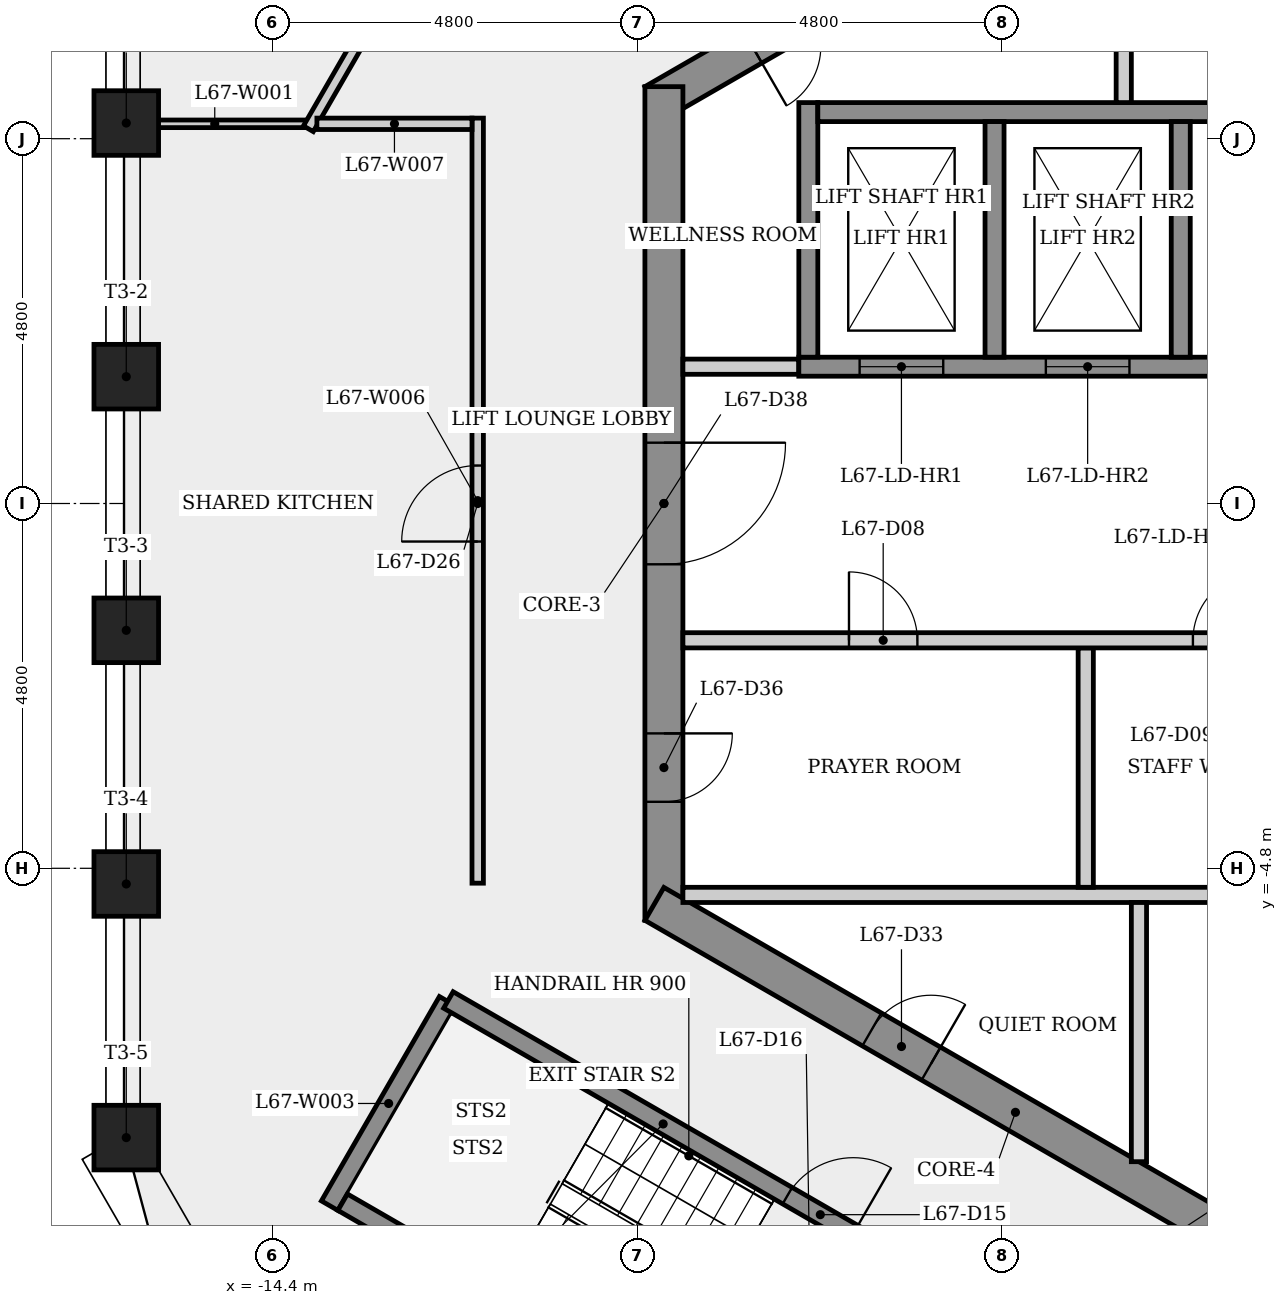
"""IFC4 building model, lengths in metres.
Left out: names, types, materials, properties, quantities, classifications, styles, units other than length and angle.
Written with IfcOpenShell. Run it as: python <this file> out.ifc"""

import sys

from ifc_helpers import new_model, si_unit, direction, frame, frame_2d, origin, origin_2d, place, context, subcontext, project, spatial, rectangle, extrude, element, fill, save


model = new_model("IFC4")
c1 = context("Model", 3, precision=1e-05, world=origin(), true_north=direction((0.0, 1.0)))
c2 = subcontext(c1, "Body", "Model", "MODEL_VIEW")
j1 = project(units=[si_unit("LENGTHUNIT", "METRE"), si_unit("PLANEANGLEUNIT", "RADIAN")], contexts=[c1])
p1 = place(None, origin())
s1 = spatial("IfcSite", under=j1, at=p1, CompositionType="ELEMENT")
p2 = place(p1, origin())
s2 = spatial("IfcBuilding", under=s1, at=p2, CompositionType="ELEMENT")
p3 = place(p2, frame((0.0, 0.0, 249.5)))
s3 = spatial("IfcBuildingStorey", under=s2, at=p3, CompositionType="ELEMENT", Elevation=249.5)
p4 = place(p3, frame((0.125, 10.753, 0.0), z_axis=(0.0, 0.0, 1.0), x_axis=(-0.866023993627, -0.500002442456, 0.0)))
e1 = element("IfcWall", 1, at=p4, inside=s3, PredefinedType="SHEAR", context=c2, shape_type="SweptSolid", body=[
    extrude(rectangle(XDim=10.97, YDim=0.5, at=frame_2d((5.485, 0.0))), origin(), (0.0, 0.0, 1.0), 3.4),
])
p5 = place(p4, frame((8.581, 0.0, 0.0)))
e2 = element("IfcOpeningElement", 2, at=p5, cuts=e1, PredefinedType="OPENING", context=c2, shape_type="SweptSolid", body=[
    extrude(rectangle(XDim=0.9, YDim=2.1, at=frame_2d((0.45, 1.05))), frame((0.0, 0.26, 0.0), z_axis=(0.0, -1.0, 0.0), x_axis=(1.0, 0.0, 0.0)), (0.0, 0.0, 1.0), 0.52),
])
p6 = place(p4, frame((1.687, 0.0, 0.0)))
e3 = element("IfcOpeningElement", 3, at=p6, cuts=e1, PredefinedType="OPENING", context=c2, shape_type="SweptSolid", body=[
    extrude(rectangle(XDim=0.9, YDim=2.1, at=frame_2d((0.45, 1.05))), frame((0.0, 0.26, 0.0), z_axis=(0.0, -1.0, 0.0), x_axis=(1.0, 0.0, 0.0)), (0.0, 0.0, 1.0), 0.52),
])
p7 = place(p3, frame((-9.25, 5.485, 0.0), z_axis=(0.0, 0.0, 1.0), x_axis=(0.0, -1.0, 0.0)))
e4 = element("IfcWall", 4, at=p7, inside=s3, PredefinedType="SHEAR", context=c2, shape_type="SweptSolid", body=[
    extrude(rectangle(XDim=10.97, YDim=0.5, at=frame_2d((5.485, 0.0))), origin(), (0.0, 0.0, 1.0), 3.4),
])
p8 = place(p7, frame((8.51, 0.0, 0.0)))
e5 = element("IfcOpeningElement", 5, at=p8, cuts=e4, PredefinedType="OPENING", context=c2, shape_type="SweptSolid", body=[
    extrude(rectangle(XDim=0.9, YDim=2.1, at=frame_2d((0.45, 1.05))), frame((0.0, 0.26, 0.0), z_axis=(0.0, -1.0, 0.0), x_axis=(1.0, 0.0, 0.0)), (0.0, 0.0, 1.0), 0.52),
])
p9 = place(p7, frame((4.685, 0.0, 0.0)))
e6 = element("IfcOpeningElement", 6, at=p9, cuts=e4, PredefinedType="OPENING", context=c2, shape_type="SweptSolid", body=[
    extrude(rectangle(XDim=1.6, YDim=2.1, at=frame_2d((0.8, 1.05))), frame((0.0, 0.26, 0.0), z_axis=(0.0, -1.0, 0.0), x_axis=(1.0, 0.0, 0.0)), (0.0, 0.0, 1.0), 0.52),
])
p10 = place(p3, frame((-9.375, -5.268, 0.0), z_axis=(0.0, 0.0, 1.0), x_axis=(0.866023993627, -0.500002442456, 0.0)))
e7 = element("IfcWall", 7, at=p10, inside=s3, PredefinedType="SHEAR", context=c2, shape_type="SweptSolid", body=[
    extrude(rectangle(XDim=10.97, YDim=0.5, at=frame_2d((5.485, 0.0))), origin(), (0.0, 0.0, 1.0), 3.4),
])
p11 = place(p10, frame((3.303, 0.0, 0.0)))
e8 = element("IfcOpeningElement", 8, at=p11, cuts=e7, PredefinedType="OPENING", context=c2, shape_type="SweptSolid", body=[
    extrude(rectangle(XDim=0.9, YDim=2.1, at=frame_2d((0.45, 1.05))), frame((0.0, 0.26, 0.0), z_axis=(0.0, -1.0, 0.0), x_axis=(1.0, 0.0, 0.0)), (0.0, 0.0, 1.0), 0.52),
])
for number, where, z_axis, x_axis in (
    (9, (-16.324, 5.006, 0.0), (0.0, 0.0, 1.0), (-1.0, 0.0, 0.0)),
    (10, (-16.324, 1.669, 0.0), (0.0, 0.0, 1.0), (-1.0, 0.0, 0.0)),
    (11, (-16.324, -1.669, 0.0), (0.0, 0.0, 1.0), (-1.0, 0.0, 0.0)),
    (12, (-16.324, -5.006, 0.0), (0.0, 0.0, 1.0), (-1.0, 0.0, 0.0)),
    (13, (-16.324, -8.344, 0.0), (0.0, 0.0, 1.0), (-1.0, 0.0, 0.0)),
):
    element("IfcColumn", number, at=place(p3, frame(where, z_axis=z_axis, x_axis=x_axis)), inside=s3, PredefinedType="COLUMN", context=c2, shape_type="SweptSolid", body=[
        extrude(rectangle(XDim=0.85, YDim=0.85, at=origin_2d()), origin(), (0.0, 0.0, 1.0), 3.4),
    ])
p12 = place(p3, frame((-13.966, 4.996, 0.0), z_axis=(0.0, 0.0, 1.0), x_axis=(-1.0, 0.0, 0.0)))
e14 = element("IfcWall", 14, at=p12, inside=s3, PredefinedType="PARTITIONING", context=c2, shape_type="SweptSolid", body=[
    extrude(rectangle(XDim=2.388, YDim=0.1, at=frame_2d((1.194, 0.0))), origin(), (0.0, 0.0, 1.0), 3.0),
])
p13 = place(p3, frame((-13.928, 4.931, 0.0), z_axis=(0.0, 0.0, 1.0), x_axis=(0.499980697609, 0.866036547738, 0.0)))
e15 = element("IfcWall", 15, at=p13, inside=s3, PredefinedType="PARTITIONING", context=c2, shape_type="SweptSolid", body=[
    extrude(rectangle(XDim=6.029, YDim=0.15, at=frame_2d((3.014, 0.0))), origin(), (0.0, 0.0, 1.0), 3.0),
])
p14 = place(p13, frame((2.514, 0.0, 0.0)))
e16 = element("IfcOpeningElement", 16, at=p14, cuts=e15, PredefinedType="OPENING", context=c2, shape_type="SweptSolid", body=[
    extrude(rectangle(XDim=1.0, YDim=2.1, at=frame_2d((0.5, 1.05))), frame((0.0, 0.085, 0.0), z_axis=(0.0, -1.0, 0.0), x_axis=(1.0, 0.0, 0.0)), (0.0, 0.0, 1.0), 0.17),
])
p15 = place(p3, frame((-13.648, -9.239, 0.0), z_axis=(0.0, 0.0, 1.0), x_axis=(0.500003782172, 0.866023220135, 0.0)))
e17 = element("IfcWall", 17, at=p15, inside=s3, PredefinedType="SHEAR", context=c2, shape_type="SweptSolid", body=[
    extrude(rectangle(XDim=3.105, YDim=0.25, at=frame_2d((1.552, 0.0))), origin(), (0.0, 0.0, 1.0), 3.0),
])
p16 = place(p3, frame((-12.085, -6.532, 0.0), z_axis=(0.0, 0.0, 1.0), x_axis=(0.866031063448, -0.499990197047, 0.0)))
e18 = element("IfcWall", 18, at=p16, inside=s3, PredefinedType="SHEAR", context=c2, shape_type="SweptSolid", body=[
    extrude(rectangle(XDim=6.525, YDim=0.25, at=frame_2d((3.263, 0.0))), origin(), (0.0, 0.0, 1.0), 3.0),
])
p17 = place(p16, frame((5.15, 0.0, 0.0)))
e19 = element("IfcOpeningElement", 19, at=p17, cuts=e18, PredefinedType="OPENING", context=c2, shape_type="SweptSolid", body=[
    extrude(rectangle(XDim=1.0, YDim=2.1, at=frame_2d((0.5, 1.05))), frame((0.0, 0.135, 0.0), z_axis=(0.0, -1.0, 0.0), x_axis=(1.0, 0.0, 0.0)), (0.0, 0.0, 1.0), 0.27),
])
p18 = place(p3, frame((-11.7, -4.996, 0.0), z_axis=(0.0, 0.0, 1.0), x_axis=(0.0, 1.0, 0.0)))
e20 = element("IfcWall", 20, at=p18, inside=s3, PredefinedType="PARTITIONING", context=c2, shape_type="SweptSolid", body=[
    extrude(rectangle(XDim=10.067, YDim=0.15, at=frame_2d((5.033, 0.0))), origin(), (0.0, 0.0, 1.0), 3.0),
])
p19 = place(p18, frame((4.495, 0.0, 0.0)))
e21 = element("IfcOpeningElement", 21, at=p19, cuts=e20, PredefinedType="OPENING", context=c2, shape_type="SweptSolid", body=[
    extrude(rectangle(XDim=1.0, YDim=2.1, at=frame_2d((0.5, 1.05))), frame((0.0, 0.085, 0.0), z_axis=(0.0, -1.0, 0.0), x_axis=(1.0, 0.0, 0.0)), (0.0, 0.0, 1.0), 0.17),
])
p20 = place(p3, frame((-11.775, 4.996, 0.0), z_axis=(0.0, 0.0, 1.0), x_axis=(-1.0, 0.0, 0.0)))
e22 = element("IfcWall", 22, at=p20, inside=s3, PredefinedType="PARTITIONING", context=c2, shape_type="SweptSolid", body=[
    extrude(rectangle(XDim=2.041, YDim=0.15, at=frame_2d((1.021, 0.0))), origin(), (0.0, 0.0, 1.0), 3.0),
])
p21 = place(p3, frame((-9.0, 1.8, 0.0), z_axis=(0.0, 0.0, 1.0), x_axis=(1.0, 0.0, 0.0)))
e23 = element("IfcWall", 23, at=p21, inside=s3, PredefinedType="PARTITIONING", context=c2, shape_type="SweptSolid", body=[
    extrude(rectangle(XDim=1.525, YDim=0.2, at=frame_2d((0.763, 0.0))), origin(), (0.0, 0.0, 1.0), 3.0),
])
p22 = place(p3, frame((-9.0, -5.15, 0.0), z_axis=(0.0, 0.0, 1.0), x_axis=(1.0, 0.0, 0.0)))
e24 = element("IfcWall", 24, at=p22, inside=s3, PredefinedType="PARTITIONING", context=c2, shape_type="SweptSolid", body=[
    extrude(rectangle(XDim=11.325, YDim=0.2, at=frame_2d((5.663, 0.0))), origin(), (0.0, 0.0, 1.0), 3.0),
])
p23 = place(p3, frame((-8.06, -12.321, 0.0), z_axis=(0.0, 0.0, 1.0), x_axis=(-0.866029591389, 0.499992746786, 0.0)))
e25 = element("IfcWall", 25, at=p23, inside=s3, PredefinedType="SHEAR", context=c2, shape_type="SweptSolid", body=[
    extrude(rectangle(XDim=6.255, YDim=0.25, at=frame_2d((3.127, 0.0))), origin(), (0.0, 0.0, 1.0), 3.0),
])
p24 = place(p3, frame((-7.475, 1.8, 0.0), z_axis=(0.0, 0.0, 1.0), x_axis=(1.0, 0.0, 0.0)))
e26 = element("IfcWall", 26, at=p24, inside=s3, PredefinedType="SHEAR", context=c2, shape_type="SweptSolid", body=[
    extrude(rectangle(XDim=14.95, YDim=0.25, at=frame_2d((7.475, 0.0))), origin(), (0.0, 0.0, 1.0), 3.0),
])
p25 = place(p24, frame((0.8, 0.0, 0.0)))
e27 = element("IfcOpeningElement", 27, at=p25, cuts=e26, PredefinedType="OPENING", context=c2, shape_type="SweptSolid", body=[
    extrude(rectangle(XDim=1.1, YDim=2.1, at=frame_2d((0.55, 1.05))), frame((0.0, 0.135, 0.0), z_axis=(0.0, -1.0, 0.0), x_axis=(1.0, 0.0, 0.0)), (0.0, 0.0, 1.0), 0.27),
])
p26 = place(p24, frame((3.25, 0.0, 0.0)))
e28 = element("IfcOpeningElement", 28, at=p26, cuts=e26, PredefinedType="OPENING", context=c2, shape_type="SweptSolid", body=[
    extrude(rectangle(XDim=1.1, YDim=2.1, at=frame_2d((0.55, 1.05))), frame((0.0, 0.135, 0.0), z_axis=(0.0, -1.0, 0.0), x_axis=(1.0, 0.0, 0.0)), (0.0, 0.0, 1.0), 0.27),
])
p27 = place(p24, frame((5.7, 0.0, 0.0)))
e29 = element("IfcOpeningElement", 29, at=p27, cuts=e26, PredefinedType="OPENING", context=c2, shape_type="SweptSolid", body=[
    extrude(rectangle(XDim=1.1, YDim=2.1, at=frame_2d((0.55, 1.05))), frame((0.0, 0.135, 0.0), z_axis=(0.0, -1.0, 0.0), x_axis=(1.0, 0.0, 0.0)), (0.0, 0.0, 1.0), 0.27),
])
p28 = place(p24, frame((8.15, 0.0, 0.0)))
e30 = element("IfcOpeningElement", 30, at=p28, cuts=e26, PredefinedType="OPENING", context=c2, shape_type="SweptSolid", body=[
    extrude(rectangle(XDim=1.1, YDim=2.1, at=frame_2d((0.55, 1.05))), frame((0.0, 0.135, 0.0), z_axis=(0.0, -1.0, 0.0), x_axis=(1.0, 0.0, 0.0)), (0.0, 0.0, 1.0), 0.27),
])
p29 = place(p24, frame((10.6, 0.0, 0.0)))
e31 = element("IfcOpeningElement", 31, at=p29, cuts=e26, PredefinedType="OPENING", context=c2, shape_type="SweptSolid", body=[
    extrude(rectangle(XDim=1.1, YDim=2.1, at=frame_2d((0.55, 1.05))), frame((0.0, 0.135, 0.0), z_axis=(0.0, -1.0, 0.0), x_axis=(1.0, 0.0, 0.0)), (0.0, 0.0, 1.0), 0.27),
])
p30 = place(p24, frame((13.05, 0.0, 0.0)))
e32 = element("IfcOpeningElement", 32, at=p30, cuts=e26, PredefinedType="OPENING", context=c2, shape_type="SweptSolid", body=[
    extrude(rectangle(XDim=1.1, YDim=2.1, at=frame_2d((0.55, 1.05))), frame((0.0, 0.135, 0.0), z_axis=(0.0, -1.0, 0.0), x_axis=(1.0, 0.0, 0.0)), (0.0, 0.0, 1.0), 0.27),
])
p31 = place(p3, frame((-7.35, 1.925, 0.0), z_axis=(0.0, 0.0, 1.0), x_axis=(0.0, 1.0, 0.0)))
e33 = element("IfcWall", 33, at=p31, inside=s3, PredefinedType="SHEAR", context=c2, shape_type="SweptSolid", body=[
    extrude(rectangle(XDim=3.35, YDim=0.25, at=frame_2d((1.675, 0.0))), origin(), (0.0, 0.0, 1.0), 3.0),
])
p32 = place(p3, frame((-7.225, 5.15, 0.0), z_axis=(0.0, 0.0, 1.0), x_axis=(1.0, 0.0, 0.0)))
e34 = element("IfcWall", 34, at=p32, inside=s3, PredefinedType="SHEAR", context=c2, shape_type="SweptSolid", body=[
    extrude(rectangle(XDim=14.7, YDim=0.25, at=frame_2d((7.35, 0.0))), origin(), (0.0, 0.0, 1.0), 3.0),
])
p33 = place(p3, frame((-4.9, 5.025, 0.0), z_axis=(0.0, 0.0, 1.0), x_axis=(0.0, -1.0, 0.0)))
e35 = element("IfcWall", 35, at=p33, inside=s3, PredefinedType="SHEAR", context=c2, shape_type="SweptSolid", body=[
    extrude(rectangle(XDim=3.1, YDim=0.25, at=frame_2d((1.55, 0.0))), origin(), (0.0, 0.0, 1.0), 3.4),
])
p34 = place(p3, frame((-3.7, -1.9, 0.0), z_axis=(0.0, 0.0, 1.0), x_axis=(0.0, -1.0, 0.0)))
e36 = element("IfcWall", 36, at=p34, inside=s3, PredefinedType="PARTITIONING", context=c2, shape_type="SweptSolid", body=[
    extrude(rectangle(XDim=3.15, YDim=0.2, at=frame_2d((1.575, 0.0))), origin(), (0.0, 0.0, 1.0), 3.0),
])
p35 = place(p3, frame((-9.0, -1.8, 0.0), z_axis=(0.0, 0.0, 1.0), x_axis=(1.0, 0.0, 0.0)))
e37 = element("IfcWall", 37, at=p35, inside=s3, PredefinedType="PARTITIONING", context=c2, shape_type="SweptSolid", body=[
    extrude(rectangle(XDim=11.325, YDim=0.2, at=frame_2d((5.663, 0.0))), origin(), (0.0, 0.0, 1.0), 3.0),
])
p36 = place(p35, frame((2.185, 0.0, 0.0)))
e38 = element("IfcOpeningElement", 38, at=p36, cuts=e37, PredefinedType="OPENING", context=c2, shape_type="SweptSolid", body=[
    extrude(rectangle(XDim=0.9, YDim=2.1, at=frame_2d((0.45, 1.05))), frame((0.0, 0.11, 0.0), z_axis=(0.0, -1.0, 0.0), x_axis=(1.0, 0.0, 0.0)), (0.0, 0.0, 1.0), 0.22),
])
p37 = place(p35, frame((6.71, 0.0, 0.0)))
e39 = element("IfcOpeningElement", 39, at=p37, cuts=e37, PredefinedType="OPENING", context=c2, shape_type="SweptSolid", body=[
    extrude(rectangle(XDim=0.9, YDim=2.1, at=frame_2d((0.45, 1.05))), frame((0.0, 0.11, 0.0), z_axis=(0.0, -1.0, 0.0), x_axis=(1.0, 0.0, 0.0)), (0.0, 0.0, 1.0), 0.22),
])
p38 = place(p35, frame((9.713, 0.0, 0.0)))
e40 = element("IfcOpeningElement", 40, at=p38, cuts=e37, PredefinedType="OPENING", context=c2, shape_type="SweptSolid", body=[
    extrude(rectangle(XDim=0.9, YDim=2.1, at=frame_2d((0.45, 1.05))), frame((0.0, 0.11, 0.0), z_axis=(0.0, -1.0, 0.0), x_axis=(1.0, 0.0, 0.0)), (0.0, 0.0, 1.0), 0.22),
])
p39 = place(p3, frame((-3.2, 8.545, 0.0), z_axis=(0.0, 0.0, 1.0), x_axis=(0.0, -1.0, 0.0)))
e41 = element("IfcWall", 41, at=p39, inside=s3, PredefinedType="PARTITIONING", context=c2, shape_type="SweptSolid", body=[
    extrude(rectangle(XDim=3.27, YDim=0.2, at=frame_2d((1.635, 0.0))), origin(), (0.0, 0.0, 1.0), 3.0),
])
p40 = place(p3, frame((-3.0, -5.25, 0.0), z_axis=(0.0, 0.0, 1.0), x_axis=(0.0, -1.0, 0.0)))
e42 = element("IfcWall", 42, at=p40, inside=s3, PredefinedType="PARTITIONING", context=c2, shape_type="SweptSolid", body=[
    extrude(rectangle(XDim=3.41, YDim=0.2, at=frame_2d((1.705, 0.0))), origin(), (0.0, 0.0, 1.0), 3.0),
])
p41 = place(p3, frame((-2.45, 5.025, 0.0), z_axis=(0.0, 0.0, 1.0), x_axis=(0.0, -1.0, 0.0)))
e43 = element("IfcWall", 43, at=p41, inside=s3, PredefinedType="SHEAR", context=c2, shape_type="SweptSolid", body=[
    extrude(rectangle(XDim=3.1, YDim=0.25, at=frame_2d((1.55, 0.0))), origin(), (0.0, 0.0, 1.0), 3.4),
])
p42 = place(p25, origin())
e44 = element("IfcDoor", 44, at=p42, inside=s3, OperationType="SLIDING_TO_LEFT", PredefinedType="DOOR", context=c2, shape_type="SweptSolid", body=[
    extrude(rectangle(XDim=1.1, YDim=2.1, at=frame_2d((0.55, 1.05))), frame((0.0, 0.025, 0.0), z_axis=(0.0, -1.0, 0.0), x_axis=(1.0, 0.0, 0.0)), (0.0, 0.0, 1.0), 0.05),
])
fill(e27, e44)
p43 = place(p26, origin())
e45 = element("IfcDoor", 45, at=p43, inside=s3, OperationType="SLIDING_TO_LEFT", PredefinedType="DOOR", context=c2, shape_type="SweptSolid", body=[
    extrude(rectangle(XDim=1.1, YDim=2.1, at=frame_2d((0.55, 1.05))), frame((0.0, 0.025, 0.0), z_axis=(0.0, -1.0, 0.0), x_axis=(1.0, 0.0, 0.0)), (0.0, 0.0, 1.0), 0.05),
])
fill(e28, e45)
p44 = place(p36, origin())
e46 = element("IfcDoor", 46, at=p44, inside=s3, OperationType="SINGLE_SWING_LEFT", PredefinedType="DOOR", context=c2, shape_type="SweptSolid", body=[
    extrude(rectangle(XDim=0.9, YDim=2.1, at=frame_2d((0.45, 1.05))), frame((0.0, 0.025, 0.0), z_axis=(0.0, -1.0, 0.0), x_axis=(1.0, 0.0, 0.0)), (0.0, 0.0, 1.0), 0.05),
])
fill(e38, e46)
p45 = place(p37, origin())
e47 = element("IfcDoor", 47, at=p45, inside=s3, OperationType="SINGLE_SWING_RIGHT", PredefinedType="DOOR", context=c2, shape_type="SweptSolid", body=[
    extrude(rectangle(XDim=0.9, YDim=2.1, at=frame_2d((0.45, 1.05))), frame((0.0, 0.025, 0.0), z_axis=(0.0, -1.0, 0.0), x_axis=(1.0, 0.0, 0.0)), (0.0, 0.0, 1.0), 0.05),
])
fill(e39, e47)
p46 = place(p17, origin())
e48 = element("IfcDoor", 48, at=p46, inside=s3, OperationType="SINGLE_SWING_RIGHT", PredefinedType="DOOR", context=c2, shape_type="SweptSolid", body=[
    extrude(rectangle(XDim=1.0, YDim=2.1, at=frame_2d((0.5, 1.05))), frame((0.0, 0.025, 0.0), z_axis=(0.0, -1.0, 0.0), x_axis=(1.0, 0.0, 0.0)), (0.0, 0.0, 1.0), 0.05),
])
fill(e19, e48)
p47 = place(p19, origin())
e49 = element("IfcDoor", 49, at=p47, inside=s3, OperationType="SINGLE_SWING_LEFT", PredefinedType="DOOR", context=c2, shape_type="SweptSolid", body=[
    extrude(rectangle(XDim=1.0, YDim=2.1, at=frame_2d((0.5, 1.05))), frame((0.0, 0.025, 0.0), z_axis=(0.0, -1.0, 0.0), x_axis=(1.0, 0.0, 0.0)), (0.0, 0.0, 1.0), 0.05),
])
fill(e21, e49)
p48 = place(p11, origin())
e50 = element("IfcDoor", 50, at=p48, inside=s3, OperationType="SINGLE_SWING_RIGHT", PredefinedType="DOOR", context=c2, shape_type="SweptSolid", body=[
    extrude(rectangle(XDim=0.9, YDim=2.1, at=frame_2d((0.45, 1.05))), frame((0.0, 0.025, 0.0), z_axis=(0.0, -1.0, 0.0), x_axis=(1.0, 0.0, 0.0)), (0.0, 0.0, 1.0), 0.05),
])
fill(e8, e50)
p49 = place(p8, origin())
e51 = element("IfcDoor", 51, at=p49, inside=s3, OperationType="SINGLE_SWING_LEFT", PredefinedType="DOOR", context=c2, shape_type="SweptSolid", body=[
    extrude(rectangle(XDim=0.9, YDim=2.1, at=frame_2d((0.45, 1.05))), frame((0.0, 0.025, 0.0), z_axis=(0.0, -1.0, 0.0), x_axis=(1.0, 0.0, 0.0)), (0.0, 0.0, 1.0), 0.05),
])
fill(e5, e51)
p50 = place(p9, origin())
e52 = element("IfcDoor", 52, at=p50, inside=s3, OperationType="SINGLE_SWING_LEFT", PredefinedType="DOOR", context=c2, shape_type="SweptSolid", body=[
    extrude(rectangle(XDim=1.6, YDim=2.1, at=frame_2d((0.8, 1.05))), frame((0.0, 0.025, 0.0), z_axis=(0.0, -1.0, 0.0), x_axis=(1.0, 0.0, 0.0)), (0.0, 0.0, 1.0), 0.05),
])
fill(e6, e52)
save(model, sys.argv[1])
